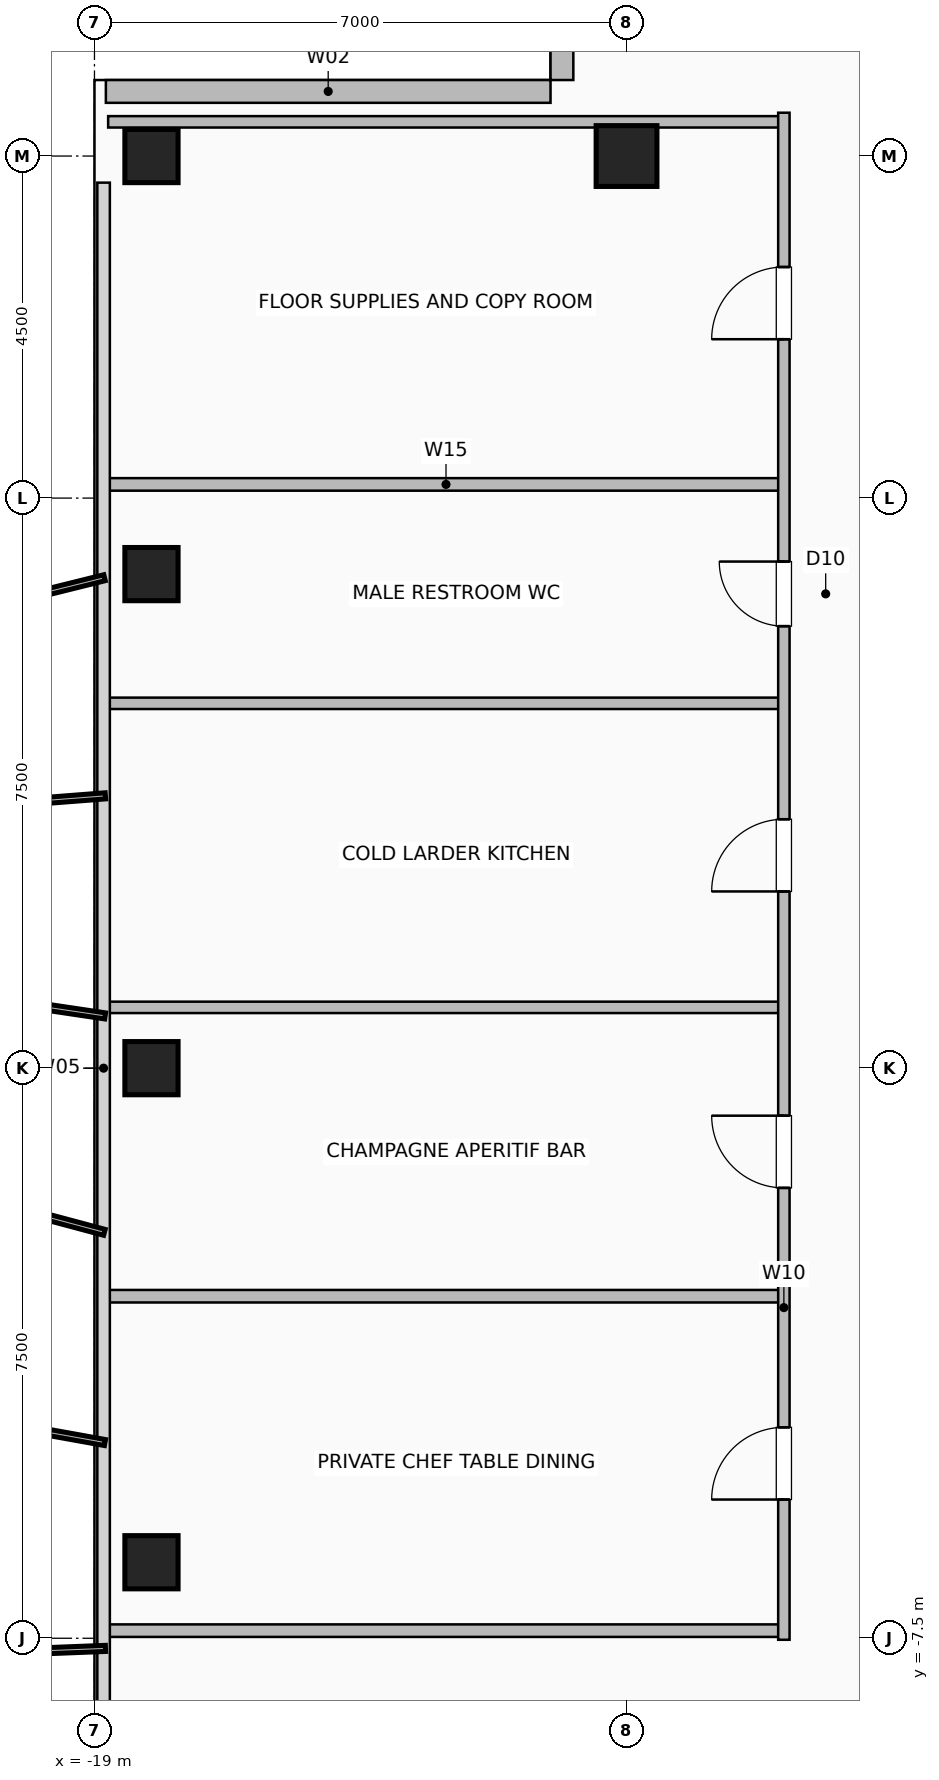
"""IFC4 building model, lengths in metres.
Left out: names, types, materials, properties, quantities, classifications, styles, units other than length and angle.
Written with IfcOpenShell. Run it as: python <this file> out.ifc"""

import sys

from ifc_helpers import new_model, si_unit, direction, frame, frame_2d, origin, origin_2d, place, context, subcontext, project, spatial, rectangle, hollow_rectangle, extrude, element, fill, save


model = new_model("IFC4")
c1 = context("Model", 3, precision=1e-05, world=origin(), true_north=direction((0.0, 1.0)))
c2 = subcontext(c1, "Body", "Model", "MODEL_VIEW")
j1 = project(units=[si_unit("LENGTHUNIT", "METRE"), si_unit("PLANEANGLEUNIT", "RADIAN")], contexts=[c1])
p1 = place(None, origin())
s1 = spatial("IfcSite", under=j1, at=p1, CompositionType="ELEMENT")
p2 = place(p1, origin())
s2 = spatial("IfcBuilding", under=s1, at=p2, CompositionType="ELEMENT")
p3 = place(p2, frame((0.0, 0.0, 293.6)))
s3 = spatial("IfcBuildingStorey", under=s2, at=p3, CompositionType="ELEMENT", Elevation=293.6)
for number, where, z_axis, x_axis in (
    (1, (-18.25, -6.5, 0.0), (0.0, 0.0, 1.0), (1.0, 0.0, 0.0)),
    (2, (-18.25, 0.0, 0.0), (0.0, 0.0, 1.0), (1.0, 0.0, 0.0)),
    (3, (-18.25, 6.5, 0.0), (0.0, 0.0, 1.0), (1.0, 0.0, 0.0)),
    (4, (-18.25, 12.0, 0.0), (0.0, 0.0, 1.0), (1.0, 0.0, 0.0)),
):
    element("IfcColumn", number, at=place(p3, frame(where, z_axis=z_axis, x_axis=x_axis)), inside=s3, PredefinedType="COLUMN", context=c2, shape_type="SweptSolid", body=[
        extrude(hollow_rectangle(XDim=0.7, YDim=0.7, WallThickness=0.035, at=origin_2d()), origin(), (0.0, 0.0, 1.0), 3.6),
    ])
p4 = place(p3, frame((-12.0, 12.0, 0.0), z_axis=(0.0, 0.0, 1.0), x_axis=(1.0, 0.0, 0.0)))
e5 = element("IfcColumn", 5, at=p4, inside=s3, PredefinedType="COLUMN", context=c2, shape_type="SweptSolid", body=[
    extrude(hollow_rectangle(XDim=0.8, YDim=0.8, WallThickness=0.04, at=origin_2d()), origin(), (0.0, 0.0, 1.0), 3.6),
])
p5 = place(p3, frame((-12.85, 18.85, 0.0), z_axis=(0.0, 0.0, 1.0), x_axis=(0.0, -1.0, 0.0)))
e6 = element("IfcWall", 6, at=p5, inside=s3, PredefinedType="SOLIDWALL", context=c2, shape_type="SweptSolid", body=[
    extrude(rectangle(XDim=5.85, YDim=0.3, at=frame_2d((2.925, 0.0))), origin(), (0.0, 0.0, 1.0), 3.36),
])
p6 = place(p5, frame((2.175, 0.0, 0.9)))
e7 = element("IfcOpeningElement", 7, at=p6, cuts=e6, PredefinedType="OPENING", context=c2, shape_type="SweptSolid", body=[
    extrude(rectangle(XDim=1.5, YDim=1.8, at=frame_2d((0.75, 0.9))), frame((0.0, 0.16, 0.0), z_axis=(0.0, -1.0, 0.0), x_axis=(1.0, 0.0, 0.0)), (0.0, 0.0, 1.0), 0.32),
])
p7 = place(p3, frame((-18.85, 12.85, 0.0), z_axis=(0.0, 0.0, 1.0), x_axis=(1.0, 0.0, 0.0)))
e8 = element("IfcWall", 8, at=p7, inside=s3, PredefinedType="SOLIDWALL", context=c2, shape_type="SweptSolid", body=[
    extrude(rectangle(XDim=5.85, YDim=0.3, at=frame_2d((2.925, 0.0))), origin(), (0.0, 0.0, 1.0), 3.36),
])
for number, where, z_axis, x_axis in (
    (9, (-18.82, 7.68, 0.0), (0.0, 0.0, 1.0), (1.0, 0.0, 0.0)),
    (10, (-18.82, -7.4, 0.0), (0.0, 0.0, 1.0), (1.0, 0.0, 0.0)),
    (11, (-18.82, -3.0, 0.0), (0.0, 0.0, 1.0), (1.0, 0.0, 0.0)),
):
    element("IfcWall", number, at=place(p3, frame(where, z_axis=z_axis, x_axis=x_axis)), inside=s3, PredefinedType="PLUMBINGWALL", context=c2, shape_type="SweptSolid", body=[
        extrude(rectangle(XDim=8.89, YDim=0.165, at=frame_2d((4.445, 0.0))), origin(), (0.0, 0.0, 1.0), 3.36),
    ])
p8 = place(p3, frame((-18.82, 0.8, 0.0), z_axis=(0.0, 0.0, 1.0), x_axis=(1.0, 0.0, 0.0)))
e12 = element("IfcWall", 12, at=p8, inside=s3, PredefinedType="PARTITIONING", context=c2, shape_type="SweptSolid", body=[
    extrude(rectangle(XDim=8.89, YDim=0.15, at=frame_2d((4.445, 0.0))), origin(), (0.0, 0.0, 1.0), 3.36),
])
p9 = place(p3, frame((-18.82, 4.8, 0.0), z_axis=(0.0, 0.0, 1.0), x_axis=(1.0, 0.0, 0.0)))
e13 = element("IfcWall", 13, at=p9, inside=s3, PredefinedType="PARTITIONING", context=c2, shape_type="SweptSolid", body=[
    extrude(rectangle(XDim=8.89, YDim=0.15, at=frame_2d((4.445, 0.0))), origin(), (0.0, 0.0, 1.0), 2.977),
])
p10 = place(p3, frame((-18.82, 12.45, 0.0), z_axis=(0.0, 0.0, 1.0), x_axis=(1.0, 0.0, 0.0)))
e14 = element("IfcWall", 14, at=p10, inside=s3, PredefinedType="PARTITIONING", context=c2, shape_type="SweptSolid", body=[
    extrude(rectangle(XDim=8.89, YDim=0.15, at=frame_2d((4.445, 0.0))), origin(), (0.0, 0.0, 1.0), 3.36),
])
p11 = place(p3, frame((-9.93, -7.52, 0.0), z_axis=(0.0, 0.0, 1.0), x_axis=(0.0, 1.0, 0.0)))
e15 = element("IfcWall", 15, at=p11, inside=s3, PredefinedType="PARTITIONING", context=c2, shape_type="SweptSolid", body=[
    extrude(rectangle(XDim=20.09, YDim=0.15, at=frame_2d((10.045, 0.0))), origin(), (0.0, 0.0, 1.0), 3.36),
])
p12 = place(p11, frame((1.845, 0.0, 0.0)))
e16 = element("IfcOpeningElement", 16, at=p12, cuts=e15, PredefinedType="OPENING", context=c2, shape_type="SweptSolid", body=[
    extrude(rectangle(XDim=0.95, YDim=2.06, at=frame_2d((0.475, 1.03))), frame((0.0, 0.085, 0.0), z_axis=(0.0, -1.0, 0.0), x_axis=(1.0, 0.0, 0.0)), (0.0, 0.0, 1.0), 0.17),
])
p13 = place(p11, frame((5.945, 0.0, 0.0)))
e17 = element("IfcOpeningElement", 17, at=p13, cuts=e15, PredefinedType="OPENING", context=c2, shape_type="SweptSolid", body=[
    extrude(rectangle(XDim=0.95, YDim=2.06, at=frame_2d((0.475, 1.03))), frame((0.0, 0.085, 0.0), z_axis=(0.0, -1.0, 0.0), x_axis=(1.0, 0.0, 0.0)), (0.0, 0.0, 1.0), 0.17),
])
p14 = place(p11, frame((9.845, 0.0, 0.0)))
e18 = element("IfcOpeningElement", 18, at=p14, cuts=e15, PredefinedType="OPENING", context=c2, shape_type="SweptSolid", body=[
    extrude(rectangle(XDim=0.95, YDim=2.06, at=frame_2d((0.475, 1.03))), frame((0.0, 0.085, 0.0), z_axis=(0.0, -1.0, 0.0), x_axis=(1.0, 0.0, 0.0)), (0.0, 0.0, 1.0), 0.17),
])
p15 = place(p11, frame((13.335, 0.0, 0.0)))
e19 = element("IfcOpeningElement", 19, at=p15, cuts=e15, PredefinedType="OPENING", context=c2, shape_type="SweptSolid", body=[
    extrude(rectangle(XDim=0.85, YDim=2.05, at=frame_2d((0.425, 1.025))), frame((0.0, 0.085, 0.0), z_axis=(0.0, -1.0, 0.0), x_axis=(1.0, 0.0, 0.0)), (0.0, 0.0, 1.0), 0.17),
])
p16 = place(p11, frame((17.11, 0.0, 0.0)))
e20 = element("IfcOpeningElement", 20, at=p16, cuts=e15, PredefinedType="OPENING", context=c2, shape_type="SweptSolid", body=[
    extrude(rectangle(XDim=0.95, YDim=2.06, at=frame_2d((0.475, 1.03))), frame((0.0, 0.085, 0.0), z_axis=(0.0, -1.0, 0.0), x_axis=(1.0, 0.0, 0.0)), (0.0, 0.0, 1.0), 0.17),
])
p17 = place(p12, origin())
e21 = element("IfcDoor", 21, at=p17, inside=s3, OperationType="SINGLE_SWING_LEFT", PredefinedType="DOOR", context=c2, shape_type="SweptSolid", body=[
    extrude(rectangle(XDim=0.95, YDim=2.06, at=frame_2d((0.475, 1.03))), frame((0.0, 0.025, 0.0), z_axis=(0.0, -1.0, 0.0), x_axis=(1.0, 0.0, 0.0)), (0.0, 0.0, 1.0), 0.05),
])
fill(e16, e21)
p18 = place(p13, origin())
e22 = element("IfcDoor", 22, at=p18, inside=s3, OperationType="SINGLE_SWING_RIGHT", PredefinedType="DOOR", context=c2, shape_type="SweptSolid", body=[
    extrude(rectangle(XDim=0.95, YDim=2.06, at=frame_2d((0.475, 1.03))), frame((0.0, 0.025, 0.0), z_axis=(0.0, -1.0, 0.0), x_axis=(1.0, 0.0, 0.0)), (0.0, 0.0, 1.0), 0.05),
])
fill(e17, e22)
p19 = place(p14, origin())
e23 = element("IfcDoor", 23, at=p19, inside=s3, OperationType="SINGLE_SWING_LEFT", PredefinedType="DOOR", context=c2, shape_type="SweptSolid", body=[
    extrude(rectangle(XDim=0.95, YDim=2.06, at=frame_2d((0.475, 1.03))), frame((0.0, 0.025, 0.0), z_axis=(0.0, -1.0, 0.0), x_axis=(1.0, 0.0, 0.0)), (0.0, 0.0, 1.0), 0.05),
])
fill(e18, e23)
p20 = place(p15, origin())
e24 = element("IfcDoor", 24, at=p20, inside=s3, OperationType="SINGLE_SWING_RIGHT", PredefinedType="DOOR", context=c2, shape_type="SweptSolid", body=[
    extrude(rectangle(XDim=0.85, YDim=2.05, at=frame_2d((0.425, 1.025))), frame((0.0, 0.025, 0.0), z_axis=(0.0, -1.0, 0.0), x_axis=(1.0, 0.0, 0.0)), (0.0, 0.0, 1.0), 0.05),
])
fill(e19, e24)
p21 = place(p16, origin())
e25 = element("IfcDoor", 25, at=p21, inside=s3, OperationType="SINGLE_SWING_LEFT", PredefinedType="DOOR", context=c2, shape_type="SweptSolid", body=[
    extrude(rectangle(XDim=0.95, YDim=2.06, at=frame_2d((0.475, 1.03))), frame((0.0, 0.025, 0.0), z_axis=(0.0, -1.0, 0.0), x_axis=(1.0, 0.0, 0.0)), (0.0, 0.0, 1.0), 0.05),
])
fill(e20, e25)
save(model, sys.argv[1])
